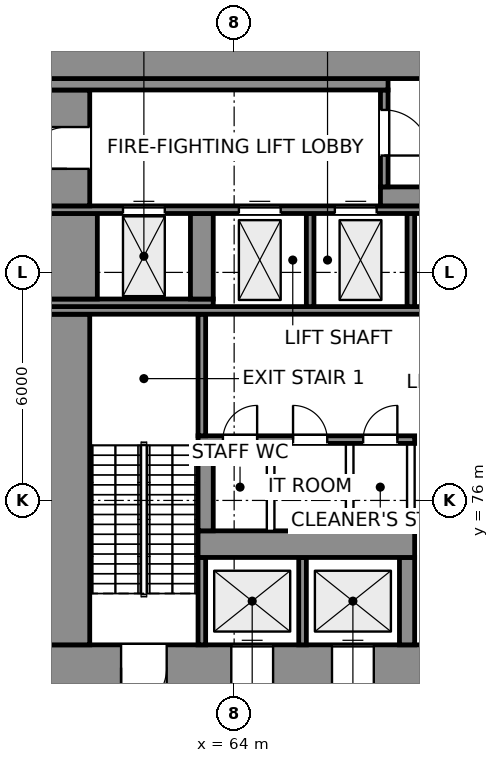
"""IFC4 building model, lengths in metres.
Left out: names, types, materials, properties, quantities, classifications, styles, units other than length and angle.
Written with IfcOpenShell. Run it as: python <this file> out.ifc"""

import sys

from ifc_helpers import new_model, si_unit, direction, frame, frame_2d, origin, place, context, subcontext, project, spatial, rectangle, extrude, element, fill, save


model = new_model("IFC4")
c1 = context("Model", 3, precision=1e-05, world=origin(), true_north=direction((0.0, 1.0)))
c2 = subcontext(c1, "Body", "Model", "MODEL_VIEW")
j1 = project(units=[si_unit("LENGTHUNIT", "METRE"), si_unit("PLANEANGLEUNIT", "RADIAN")], contexts=[c1])
p1 = place(None, origin())
s1 = spatial("IfcSite", under=j1, at=p1, CompositionType="ELEMENT")
p2 = place(p1, origin())
s2 = spatial("IfcBuilding", under=s1, at=p2, CompositionType="ELEMENT")
p3 = place(p2, frame((0.0, 0.0, 9.0)))
s3 = spatial("IfcBuildingStorey", under=s2, at=p3, CompositionType="ELEMENT", Elevation=9.0)
p4 = place(p3, frame((59.0, 71.6, 0.0), z_axis=(0.0, 0.0, 1.0), x_axis=(1.0, 0.0, 0.0)))
e1 = element("IfcWall", 1, at=p4, inside=s3, PredefinedType="SHEAR", context=c2, shape_type="SweptSolid", body=[
    extrude(rectangle(XDim=22.0, YDim=1.2, at=frame_2d((11.0, 0.0))), origin(), (0.0, 0.0, 1.0), 6.0),
])
p5 = place(p4, frame((2.025, 0.0, 0.0)))
e2 = element("IfcOpeningElement", 2, at=p5, cuts=e1, PredefinedType="OPENING", context=c2, shape_type="SweptSolid", body=[
    extrude(rectangle(XDim=1.2, YDim=2.1, at=frame_2d((0.6, 1.05))), frame((0.0, 0.61, 0.0), z_axis=(0.0, -1.0, 0.0), x_axis=(1.0, 0.0, 0.0)), (0.0, 0.0, 1.0), 1.22),
])
p6 = place(p4, frame((18.775, 0.0, 0.0)))
e3 = element("IfcOpeningElement", 3, at=p6, cuts=e1, PredefinedType="OPENING", context=c2, shape_type="SweptSolid", body=[
    extrude(rectangle(XDim=1.2, YDim=2.1, at=frame_2d((0.6, 1.05))), frame((0.0, 0.61, 0.0), z_axis=(0.0, -1.0, 0.0), x_axis=(1.0, 0.0, 0.0)), (0.0, 0.0, 1.0), 1.22),
])
p7 = place(p4, frame((10.0, 0.0, 0.0)))
e4 = element("IfcOpeningElement", 4, at=p7, cuts=e1, PredefinedType="OPENING", context=c2, shape_type="SweptSolid", body=[
    extrude(rectangle(XDim=2.0, YDim=2.1, at=frame_2d((1.0, 1.05))), frame((0.0, 0.61, 0.0), z_axis=(0.0, -1.0, 0.0), x_axis=(1.0, 0.0, 0.0)), (0.0, 0.0, 1.0), 1.22),
])
p8 = place(p4, frame((4.925, 0.0, 0.0)))
e5 = element("IfcOpeningElement", 5, at=p8, cuts=e1, PredefinedType="OPENING", context=c2, shape_type="SweptSolid", body=[
    extrude(rectangle(XDim=1.1, YDim=2.1, at=frame_2d((0.55, 1.05))), frame((0.0, 0.61, 0.0), z_axis=(0.0, -1.0, 0.0), x_axis=(1.0, 0.0, 0.0)), (0.0, 0.0, 1.0), 1.22),
])
p9 = place(p4, frame((7.575, 0.0, 0.0)))
e6 = element("IfcOpeningElement", 6, at=p9, cuts=e1, PredefinedType="OPENING", context=c2, shape_type="SweptSolid", body=[
    extrude(rectangle(XDim=1.1, YDim=2.1, at=frame_2d((0.55, 1.05))), frame((0.0, 0.61, 0.0), z_axis=(0.0, -1.0, 0.0), x_axis=(1.0, 0.0, 0.0)), (0.0, 0.0, 1.0), 1.22),
])
p10 = place(p4, frame((13.125, 0.0, 0.0)))
e7 = element("IfcOpeningElement", 7, at=p10, cuts=e1, PredefinedType="OPENING", context=c2, shape_type="SweptSolid", body=[
    extrude(rectangle(XDim=1.1, YDim=2.1, at=frame_2d((0.55, 1.05))), frame((0.0, 0.61, 0.0), z_axis=(0.0, -1.0, 0.0), x_axis=(1.0, 0.0, 0.0)), (0.0, 0.0, 1.0), 1.22),
])
p11 = place(p4, frame((15.775, 0.0, 0.0)))
e8 = element("IfcOpeningElement", 8, at=p11, cuts=e1, PredefinedType="OPENING", context=c2, shape_type="SweptSolid", body=[
    extrude(rectangle(XDim=1.1, YDim=2.1, at=frame_2d((0.55, 1.05))), frame((0.0, 0.61, 0.0), z_axis=(0.0, -1.0, 0.0), x_axis=(1.0, 0.0, 0.0)), (0.0, 0.0, 1.0), 1.22),
])
p12 = place(p3, frame((59.6, 72.2, 0.0), z_axis=(0.0, 0.0, 1.0), x_axis=(0.0, 1.0, 0.0)))
e9 = element("IfcWall", 9, at=p12, inside=s3, PredefinedType="SHEAR", context=c2, shape_type="SweptSolid", body=[
    extrude(rectangle(XDim=8.7, YDim=1.2, at=frame_2d((4.35, 0.0))), origin(), (0.0, 0.0, 1.0), 6.0),
])
for number, where, z_axis, x_axis in (
    (10, (63.15, 72.2, 0.0), (0.0, 0.0, 1.0), (0.0, 1.0, 0.0)),
    (11, (65.8, 72.2, 0.0), (0.0, 0.0, 1.0), (0.0, 1.0, 0.0)),
):
    element("IfcWall", number, at=place(p3, frame(where, z_axis=z_axis, x_axis=x_axis)), inside=s3, PredefinedType="SHEAR", context=c2, shape_type="SweptSolid", body=[
        extrude(rectangle(XDim=2.3, YDim=0.2, at=frame_2d((1.15, 0.0))), origin(), (0.0, 0.0, 1.0), 6.0),
    ])
p13 = place(p3, frame((68.55, 72.2, 0.0), z_axis=(0.0, 0.0, 1.0), x_axis=(0.0, 1.0, 0.0)))
e12 = element("IfcWall", 12, at=p13, inside=s3, PredefinedType="SHEAR", context=c2, shape_type="SweptSolid", body=[
    extrude(rectangle(XDim=2.3, YDim=0.4, at=frame_2d((1.15, 0.0))), origin(), (0.0, 0.0, 1.0), 6.0),
])
p14 = place(p3, frame((63.05, 74.85, 0.0), z_axis=(0.0, 0.0, 1.0), x_axis=(1.0, 0.0, 0.0)))
e13 = element("IfcWall", 13, at=p14, inside=s3, PredefinedType="SHEAR", context=c2, shape_type="SweptSolid", body=[
    extrude(rectangle(XDim=5.7, YDim=0.7, at=frame_2d((2.85, 0.0))), origin(), (0.0, 0.0, 1.0), 6.0),
])
p15 = place(p3, frame((63.25, 75.2, 0.0), z_axis=(0.0, 0.0, 1.0), x_axis=(0.0, 1.0, 0.0)))
e14 = element("IfcWall", 14, at=p15, inside=s3, PredefinedType="SHEAR", context=c2, shape_type="SweptSolid", body=[
    extrude(rectangle(XDim=2.3, YDim=0.4, at=frame_2d((1.15, 0.0))), origin(), (0.0, 0.0, 1.0), 6.0),
])
for number, where, z_axis, x_axis in (
    (15, (64.96, 75.2, 0.0), (0.0, 0.0, 1.0), (0.0, 1.0, 0.0)),
    (16, (67.04, 75.2, 0.0), (0.0, 0.0, 1.0), (0.0, 1.0, 0.0)),
    (17, (68.65, 75.2, 0.0), (0.0, 0.0, 1.0), (0.0, 1.0, 0.0)),
):
    element("IfcWall", number, at=place(p3, frame(where, z_axis=z_axis, x_axis=x_axis)), inside=s3, PredefinedType="PARTITIONING", context=c2, shape_type="SweptSolid", body=[
        extrude(rectangle(XDim=2.3, YDim=0.2, at=frame_2d((1.15, 0.0))), origin(), (0.0, 0.0, 1.0), 5.65),
    ])
p16 = place(p3, frame((63.05, 77.6, 0.0), z_axis=(0.0, 0.0, 1.0), x_axis=(1.0, 0.0, 0.0)))
e18 = element("IfcWall", 18, at=p16, inside=s3, PredefinedType="SHEAR", context=c2, shape_type="SweptSolid", body=[
    extrude(rectangle(XDim=5.7, YDim=0.2, at=frame_2d((2.85, 0.0))), origin(), (0.0, 0.0, 1.0), 6.0),
])
p17 = place(p16, frame((0.655, 0.0, 0.0)))
e19 = element("IfcOpeningElement", 19, at=p17, cuts=e18, PredefinedType="OPENING", context=c2, shape_type="SweptSolid", body=[
    extrude(rectangle(XDim=0.9, YDim=2.1, at=frame_2d((0.45, 1.05))), frame((0.0, 0.11, 0.0), z_axis=(0.0, -1.0, 0.0), x_axis=(1.0, 0.0, 0.0)), (0.0, 0.0, 1.0), 0.22),
])
p18 = place(p16, frame((2.5, 0.0, 0.0)))
e20 = element("IfcOpeningElement", 20, at=p18, cuts=e18, PredefinedType="OPENING", context=c2, shape_type="SweptSolid", body=[
    extrude(rectangle(XDim=0.9, YDim=2.1, at=frame_2d((0.45, 1.05))), frame((0.0, 0.11, 0.0), z_axis=(0.0, -1.0, 0.0), x_axis=(1.0, 0.0, 0.0)), (0.0, 0.0, 1.0), 0.22),
])
p19 = place(p16, frame((4.345, 0.0, 0.0)))
e21 = element("IfcOpeningElement", 21, at=p19, cuts=e18, PredefinedType="OPENING", context=c2, shape_type="SweptSolid", body=[
    extrude(rectangle(XDim=0.9, YDim=2.1, at=frame_2d((0.45, 1.05))), frame((0.0, 0.11, 0.0), z_axis=(0.0, -1.0, 0.0), x_axis=(1.0, 0.0, 0.0)), (0.0, 0.0, 1.0), 0.22),
])
p20 = place(p3, frame((63.15, 77.7, 0.0), z_axis=(0.0, 0.0, 1.0), x_axis=(0.0, 1.0, 0.0)))
e22 = element("IfcWall", 22, at=p20, inside=s3, PredefinedType="SHEAR", context=c2, shape_type="SweptSolid", body=[
    extrude(rectangle(XDim=3.2, YDim=0.2, at=frame_2d((1.6, 0.0))), origin(), (0.0, 0.0, 1.0), 6.0),
])
p21 = place(p3, frame((59.0, 81.0, 0.0), z_axis=(0.0, 0.0, 1.0), x_axis=(1.0, 0.0, 0.0)))
e23 = element("IfcWall", 23, at=p21, inside=s3, PredefinedType="SHEAR", context=c2, shape_type="SweptSolid", body=[
    extrude(rectangle(XDim=22.0, YDim=0.2, at=frame_2d((11.0, 0.0))), origin(), (0.0, 0.0, 1.0), 6.0),
])
p22 = place(p21, frame((15.725, 0.0, 0.0)))
e24 = element("IfcOpeningElement", 24, at=p22, cuts=e23, PredefinedType="OPENING", context=c2, shape_type="SweptSolid", body=[
    extrude(rectangle(XDim=1.1, YDim=2.1, at=frame_2d((0.55, 1.05))), frame((0.0, 0.11, 0.0), z_axis=(0.0, -1.0, 0.0), x_axis=(1.0, 0.0, 0.0)), (0.0, 0.0, 1.0), 0.22),
])
p23 = place(p3, frame((59.0, 81.2, 0.0), z_axis=(0.0, 0.0, 1.0), x_axis=(1.0, 0.0, 0.0)))
e25 = element("IfcWall", 25, at=p23, inside=s3, PredefinedType="SHEAR", context=c2, shape_type="SweptSolid", body=[
    extrude(rectangle(XDim=4.45, YDim=0.2, at=frame_2d((2.225, 0.0))), origin(), (0.0, 0.0, 1.0), 6.0),
])
for number, where, z_axis, x_axis in (
    (26, (66.0, 81.1, 0.0), (0.0, 0.0, 1.0), (0.0, 1.0, 0.0)),
    (27, (68.65, 81.1, 0.0), (0.0, 0.0, 1.0), (0.0, 1.0, 0.0)),
):
    element("IfcWall", number, at=place(p3, frame(where, z_axis=z_axis, x_axis=x_axis)), inside=s3, PredefinedType="SHEAR", context=c2, shape_type="SweptSolid", body=[
        extrude(rectangle(XDim=2.45, YDim=0.2, at=frame_2d((1.225, 0.0))), origin(), (0.0, 0.0, 1.0), 6.0),
    ])
p24 = place(p3, frame((59.7, 81.3, 0.0), z_axis=(0.0, 0.0, 1.0), x_axis=(0.0, 1.0, 0.0)))
e28 = element("IfcWall", 28, at=p24, inside=s3, PredefinedType="SHEAR", context=c2, shape_type="SweptSolid", body=[
    extrude(rectangle(XDim=2.25, YDim=1.4, at=frame_2d((1.125, 0.0))), origin(), (0.0, 0.0, 1.0), 6.0),
])
p25 = place(p3, frame((63.15, 81.3, 0.0), z_axis=(0.0, 0.0, 1.0), x_axis=(0.0, 1.0, 0.0)))
e29 = element("IfcWall", 29, at=p25, inside=s3, PredefinedType="SHEAR", context=c2, shape_type="SweptSolid", body=[
    extrude(rectangle(XDim=2.25, YDim=0.6, at=frame_2d((1.125, 0.0))), origin(), (0.0, 0.0, 1.0), 6.0),
])
p26 = place(p3, frame((59.0, 83.65, 0.0), z_axis=(0.0, 0.0, 1.0), x_axis=(1.0, 0.0, 0.0)))
e30 = element("IfcWall", 30, at=p26, inside=s3, PredefinedType="SHEAR", context=c2, shape_type="SweptSolid", body=[
    extrude(rectangle(XDim=22.0, YDim=0.2, at=frame_2d((11.0, 0.0))), origin(), (0.0, 0.0, 1.0), 6.0),
])
p27 = place(p26, frame((5.125, 0.0, 0.0)))
e31 = element("IfcOpeningElement", 31, at=p27, cuts=e30, PredefinedType="OPENING", context=c2, shape_type="SweptSolid", body=[
    extrude(rectangle(XDim=1.1, YDim=2.1, at=frame_2d((0.55, 1.05))), frame((0.0, 0.11, 0.0), z_axis=(0.0, -1.0, 0.0), x_axis=(1.0, 0.0, 0.0)), (0.0, 0.0, 1.0), 0.22),
])
p28 = place(p26, frame((7.65, 0.0, 0.0)))
e32 = element("IfcOpeningElement", 32, at=p28, cuts=e30, PredefinedType="OPENING", context=c2, shape_type="SweptSolid", body=[
    extrude(rectangle(XDim=1.1, YDim=2.1, at=frame_2d((0.55, 1.05))), frame((0.0, 0.11, 0.0), z_axis=(0.0, -1.0, 0.0), x_axis=(1.0, 0.0, 0.0)), (0.0, 0.0, 1.0), 0.22),
])
p29 = place(p26, frame((18.775, 0.0, 0.0)))
e33 = element("IfcOpeningElement", 33, at=p29, cuts=e30, PredefinedType="OPENING", context=c2, shape_type="SweptSolid", body=[
    extrude(rectangle(XDim=1.2, YDim=2.1, at=frame_2d((0.6, 1.05))), frame((0.0, 0.11, 0.0), z_axis=(0.0, -1.0, 0.0), x_axis=(1.0, 0.0, 0.0)), (0.0, 0.0, 1.0), 0.22),
])
p30 = place(p26, frame((2.075, 0.0, 0.0)))
e34 = element("IfcOpeningElement", 34, at=p30, cuts=e30, PredefinedType="OPENING", context=c2, shape_type="SweptSolid", body=[
    extrude(rectangle(XDim=1.1, YDim=2.1, at=frame_2d((0.55, 1.05))), frame((0.0, 0.11, 0.0), z_axis=(0.0, -1.0, 0.0), x_axis=(1.0, 0.0, 0.0)), (0.0, 0.0, 1.0), 0.22),
])
p31 = place(p3, frame((59.6, 83.75, 0.0), z_axis=(0.0, 0.0, 1.0), x_axis=(0.0, 1.0, 0.0)))
e35 = element("IfcWall", 35, at=p31, inside=s3, PredefinedType="SHEAR", context=c2, shape_type="SweptSolid", body=[
    extrude(rectangle(XDim=3.05, YDim=1.2, at=frame_2d((1.525, 0.0))), origin(), (0.0, 0.0, 1.0), 6.0),
])
p32 = place(p31, frame((0.975, 0.0, 0.0)))
e36 = element("IfcOpeningElement", 36, at=p32, cuts=e35, PredefinedType="OPENING", context=c2, shape_type="SweptSolid", body=[
    extrude(rectangle(XDim=1.1, YDim=2.1, at=frame_2d((0.55, 1.05))), frame((0.0, 0.61, 0.0), z_axis=(0.0, -1.0, 0.0), x_axis=(1.0, 0.0, 0.0)), (0.0, 0.0, 1.0), 1.22),
])
p33 = place(p3, frame((67.85, 84.0, 0.0), z_axis=(0.0, 0.0, 1.0), x_axis=(1.0, 0.0, 0.0)))
e37 = element("IfcWall", 37, at=p33, inside=s3, PredefinedType="SHEAR", context=c2, shape_type="SweptSolid", body=[
    extrude(rectangle(XDim=9.1, YDim=0.5, at=frame_2d((4.55, 0.0))), origin(), (0.0, 0.0, 1.0), 6.0),
])
p34 = place(p3, frame((67.95, 84.25, 0.0), z_axis=(0.0, 0.0, 1.0), x_axis=(0.0, 1.0, 0.0)))
e38 = element("IfcWall", 38, at=p34, inside=s3, PredefinedType="SHEAR", context=c2, shape_type="SweptSolid", body=[
    extrude(rectangle(XDim=2.55, YDim=0.2, at=frame_2d((1.275, 0.0))), origin(), (0.0, 0.0, 1.0), 6.0),
])
p35 = place(p34, frame((0.825, 0.0, 0.0)))
e39 = element("IfcOpeningElement", 39, at=p35, cuts=e38, PredefinedType="OPENING", context=c2, shape_type="SweptSolid", body=[
    extrude(rectangle(XDim=1.2, YDim=2.1, at=frame_2d((0.6, 1.05))), frame((0.0, 0.11, 0.0), z_axis=(0.0, -1.0, 0.0), x_axis=(1.0, 0.0, 0.0)), (0.0, 0.0, 1.0), 0.22),
])
p36 = place(p3, frame((59.0, 86.95, 0.0), z_axis=(0.0, 0.0, 1.0), x_axis=(1.0, 0.0, 0.0)))
e40 = element("IfcWall", 40, at=p36, inside=s3, PredefinedType="SHEAR", context=c2, shape_type="SweptSolid", body=[
    extrude(rectangle(XDim=9.05, YDim=0.3, at=frame_2d((4.525, 0.0))), origin(), (0.0, 0.0, 1.0), 6.0),
])
p37 = place(p3, frame((59.0, 87.55, 0.0), z_axis=(0.0, 0.0, 1.0), x_axis=(1.0, 0.0, 0.0)))
e41 = element("IfcWall", 41, at=p37, inside=s3, PredefinedType="SHEAR", context=c2, shape_type="SweptSolid", body=[
    extrude(rectangle(XDim=22.0, YDim=0.9, at=frame_2d((11.0, 0.0))), origin(), (0.0, 0.0, 1.0), 6.0),
])
p38 = place(p5, frame((1.2, 0.0, 0.0), z_axis=(0.0, 0.0, 1.0), x_axis=(-1.0, 0.0, 0.0)))
e42 = element("IfcDoor", 42, at=p38, inside=s3, OperationType="SINGLE_SWING_RIGHT", PredefinedType="DOOR", context=c2, shape_type="SweptSolid", body=[
    extrude(rectangle(XDim=1.2, YDim=2.1, at=frame_2d((0.6, 1.05))), frame((0.0, 0.025, 0.0), z_axis=(0.0, -1.0, 0.0), x_axis=(1.0, 0.0, 0.0)), (0.0, 0.0, 1.0), 0.05),
])
fill(e2, e42)
p39 = place(p35, frame((1.2, 0.0, 0.0), z_axis=(0.0, 0.0, 1.0), x_axis=(-1.0, 0.0, 0.0)))
e43 = element("IfcDoor", 43, at=p39, inside=s3, OperationType="SINGLE_SWING_RIGHT", PredefinedType="DOOR", context=c2, shape_type="SweptSolid", body=[
    extrude(rectangle(XDim=1.2, YDim=2.1, at=frame_2d((0.6, 1.05))), frame((0.0, 0.025, 0.0), z_axis=(0.0, -1.0, 0.0), x_axis=(1.0, 0.0, 0.0)), (0.0, 0.0, 1.0), 0.05),
])
fill(e39, e43)
p40 = place(p32, origin())
e44 = element("IfcDoor", 44, at=p40, inside=s3, OperationType="SINGLE_SWING_LEFT", PredefinedType="DOOR", context=c2, shape_type="SweptSolid", body=[
    extrude(rectangle(XDim=1.1, YDim=2.1, at=frame_2d((0.55, 1.05))), frame((0.0, 0.025, 0.0), z_axis=(0.0, -1.0, 0.0), x_axis=(1.0, 0.0, 0.0)), (0.0, 0.0, 1.0), 0.05),
])
fill(e36, e44)
p41 = place(p27, origin())
e45 = element("IfcDoor", 45, at=p41, inside=s3, OperationType="DOUBLE_DOOR_SLIDING", PredefinedType="DOOR", context=c2, shape_type="SweptSolid", body=[
    extrude(rectangle(XDim=1.1, YDim=2.1, at=frame_2d((0.55, 1.05))), frame((0.0, 0.025, 0.0), z_axis=(0.0, -1.0, 0.0), x_axis=(1.0, 0.0, 0.0)), (0.0, 0.0, 1.0), 0.05),
])
fill(e31, e45)
p42 = place(p28, origin())
e46 = element("IfcDoor", 46, at=p42, inside=s3, OperationType="DOUBLE_DOOR_SLIDING", PredefinedType="DOOR", context=c2, shape_type="SweptSolid", body=[
    extrude(rectangle(XDim=1.1, YDim=2.1, at=frame_2d((0.55, 1.05))), frame((0.0, 0.025, 0.0), z_axis=(0.0, -1.0, 0.0), x_axis=(1.0, 0.0, 0.0)), (0.0, 0.0, 1.0), 0.05),
])
fill(e32, e46)
p43 = place(p8, origin())
e47 = element("IfcDoor", 47, at=p43, inside=s3, OperationType="DOUBLE_DOOR_SLIDING", PredefinedType="DOOR", context=c2, shape_type="SweptSolid", body=[
    extrude(rectangle(XDim=1.1, YDim=2.1, at=frame_2d((0.55, 1.05))), frame((0.0, 0.025, 0.0), z_axis=(0.0, -1.0, 0.0), x_axis=(1.0, 0.0, 0.0)), (0.0, 0.0, 1.0), 0.05),
])
fill(e5, e47)
p44 = place(p9, origin())
e48 = element("IfcDoor", 48, at=p44, inside=s3, OperationType="DOUBLE_DOOR_SLIDING", PredefinedType="DOOR", context=c2, shape_type="SweptSolid", body=[
    extrude(rectangle(XDim=1.1, YDim=2.1, at=frame_2d((0.55, 1.05))), frame((0.0, 0.025, 0.0), z_axis=(0.0, -1.0, 0.0), x_axis=(1.0, 0.0, 0.0)), (0.0, 0.0, 1.0), 0.05),
])
fill(e6, e48)
p45 = place(p30, origin())
e49 = element("IfcDoor", 49, at=p45, inside=s3, OperationType="DOUBLE_DOOR_SLIDING", PredefinedType="DOOR", context=c2, shape_type="SweptSolid", body=[
    extrude(rectangle(XDim=1.1, YDim=2.1, at=frame_2d((0.55, 1.05))), frame((0.0, 0.025, 0.0), z_axis=(0.0, -1.0, 0.0), x_axis=(1.0, 0.0, 0.0)), (0.0, 0.0, 1.0), 0.05),
])
fill(e34, e49)
p46 = place(p17, origin())
e50 = element("IfcDoor", 50, at=p46, inside=s3, OperationType="SINGLE_SWING_RIGHT", PredefinedType="DOOR", context=c2, shape_type="SweptSolid", body=[
    extrude(rectangle(XDim=0.9, YDim=2.1, at=frame_2d((0.45, 1.05))), frame((0.0, 0.025, 0.0), z_axis=(0.0, -1.0, 0.0), x_axis=(1.0, 0.0, 0.0)), (0.0, 0.0, 1.0), 0.05),
])
fill(e19, e50)
p47 = place(p18, origin())
e51 = element("IfcDoor", 51, at=p47, inside=s3, OperationType="SINGLE_SWING_LEFT", PredefinedType="DOOR", context=c2, shape_type="SweptSolid", body=[
    extrude(rectangle(XDim=0.9, YDim=2.1, at=frame_2d((0.45, 1.05))), frame((0.0, 0.025, 0.0), z_axis=(0.0, -1.0, 0.0), x_axis=(1.0, 0.0, 0.0)), (0.0, 0.0, 1.0), 0.05),
])
fill(e20, e51)
p48 = place(p19, origin())
e52 = element("IfcDoor", 52, at=p48, inside=s3, OperationType="SINGLE_SWING_RIGHT", PredefinedType="DOOR", context=c2, shape_type="SweptSolid", body=[
    extrude(rectangle(XDim=0.9, YDim=2.1, at=frame_2d((0.45, 1.05))), frame((0.0, 0.025, 0.0), z_axis=(0.0, -1.0, 0.0), x_axis=(1.0, 0.0, 0.0)), (0.0, 0.0, 1.0), 0.05),
])
fill(e21, e52)
save(model, sys.argv[1])
